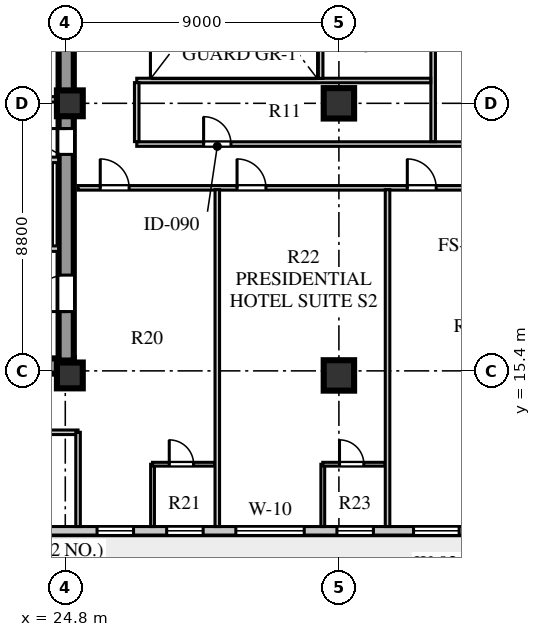
"""IFC4 building model, lengths in metres.
Left out: names, types, materials, properties, quantities, classifications, styles, units other than length and angle.
Written with IfcOpenShell. Run it as: python <this file> out.ifc"""

import sys

from ifc_helpers import new_model, si_unit, direction, frame, frame_2d, origin, origin_2d, place, context, subcontext, project, spatial, rectangle, extrude, element, fill, save


model = new_model("IFC4")
c1 = context("Model", 3, precision=1e-05, world=origin(), true_north=direction((0.0, 1.0)))
c2 = subcontext(c1, "Body", "Model", "MODEL_VIEW")
j1 = project(units=[si_unit("LENGTHUNIT", "METRE"), si_unit("PLANEANGLEUNIT", "RADIAN")], contexts=[c1])
p1 = place(None, origin())
s1 = spatial("IfcSite", under=j1, at=p1, CompositionType="ELEMENT")
p2 = place(p1, origin())
s2 = spatial("IfcBuilding", under=s1, at=p2, CompositionType="ELEMENT")
p3 = place(p2, frame((0.0, 0.0, 134.8)))
s3 = spatial("IfcBuildingStorey", under=s2, at=p3, CompositionType="ELEMENT", Elevation=134.8)
p4 = place(p3, frame((15.4, 15.56, 0.0), z_axis=(0.0, 0.0, 1.0), x_axis=(1.0, 0.0, 0.0)))
e1 = element("IfcWall", 1, at=p4, inside=s3, PredefinedType="SHEAR", context=c2, shape_type="SweptSolid", body=[
    extrude(rectangle(XDim=9.68, YDim=0.5, at=frame_2d((4.84, 0.0))), origin(), (0.0, 0.0, 1.0), 3.6),
])
p5 = place(p3, frame((24.83, 15.74, 0.0), z_axis=(0.0, 0.0, 1.0), x_axis=(0.0, 1.0, 0.0)))
e2 = element("IfcWall", 2, at=p5, inside=s3, PredefinedType="SHEAR", context=c2, shape_type="SweptSolid", body=[
    extrude(rectangle(XDim=25.76, YDim=0.5, at=frame_2d((12.88, 0.0))), origin(), (0.0, 0.0, 1.0), 3.6),
])
p6 = place(p5, frame((1.61, 0.0, 0.0)))
e3 = element("IfcOpeningElement", 3, at=p6, cuts=e2, PredefinedType="OPENING", context=c2, shape_type="SweptSolid", body=[
    extrude(rectangle(XDim=1.2, YDim=2.1, at=frame_2d((0.6, 1.05))), frame((0.0, 0.26, 0.0), z_axis=(0.0, -1.0, 0.0), x_axis=(1.0, 0.0, 0.0)), (0.0, 0.0, 1.0), 0.52),
])
p7 = place(p5, frame((6.78, 0.0, 0.0)))
e4 = element("IfcOpeningElement", 4, at=p7, cuts=e2, PredefinedType="OPENING", context=c2, shape_type="SweptSolid", body=[
    extrude(rectangle(XDim=0.85, YDim=2.06, at=frame_2d((0.425, 1.03))), frame((0.0, 0.26, 0.0), z_axis=(0.0, -1.0, 0.0), x_axis=(1.0, 0.0, 0.0)), (0.0, 0.0, 1.0), 0.52),
])
p8 = place(p5, frame((12.11, 0.0, 0.0)))
e5 = element("IfcOpeningElement", 5, at=p8, cuts=e2, PredefinedType="OPENING", context=c2, shape_type="SweptSolid", body=[
    extrude(rectangle(XDim=1.5, YDim=2.12, at=frame_2d((0.75, 1.06))), frame((0.0, 0.26, 0.0), z_axis=(0.0, -1.0, 0.0), x_axis=(1.0, 0.0, 0.0)), (0.0, 0.0, 1.0), 0.52),
])
p9 = place(p5, frame((20.11, 0.0, 0.0)))
e6 = element("IfcOpeningElement", 6, at=p9, cuts=e2, PredefinedType="OPENING", context=c2, shape_type="SweptSolid", body=[
    extrude(rectangle(XDim=1.2, YDim=2.12, at=frame_2d((0.6, 1.06))), frame((0.0, 0.26, 0.0), z_axis=(0.0, -1.0, 0.0), x_axis=(1.0, 0.0, 0.0)), (0.0, 0.0, 1.0), 0.52),
])
p10 = place(p5, frame((24.01, 0.0, 0.0)))
e7 = element("IfcOpeningElement", 7, at=p10, cuts=e2, PredefinedType="OPENING", context=c2, shape_type="SweptSolid", body=[
    extrude(rectangle(XDim=0.95, YDim=2.1, at=frame_2d((0.475, 1.05))), frame((0.0, 0.26, 0.0), z_axis=(0.0, -1.0, 0.0), x_axis=(1.0, 0.0, 0.0)), (0.0, 0.0, 1.0), 0.52),
])
for number, where, z_axis, x_axis in (
    (8, (24.95, 15.25, 0.0), (0.0, 0.0, 1.0), (1.0, 0.0, 0.0)),
    (9, (24.95, 24.2, 0.0), (0.0, 0.0, 1.0), (1.0, 0.0, 0.0)),
):
    element("IfcColumn", number, at=place(p3, frame(where, z_axis=z_axis, x_axis=x_axis)), inside=s3, PredefinedType="COLUMN", context=c2, shape_type="SweptSolid", body=[
        extrude(rectangle(XDim=0.85, YDim=0.85, at=origin_2d()), origin(), (0.0, 0.0, 1.0), 3.6),
    ])
for number, where, z_axis, x_axis in (
    (10, (33.8, 15.25, 0.0), (0.0, 0.0, 1.0), (1.0, 0.0, 0.0)),
    (11, (33.8, 24.2, 0.0), (0.0, 0.0, 1.0), (1.0, 0.0, 0.0)),
):
    element("IfcColumn", number, at=place(p3, frame(where, z_axis=z_axis, x_axis=x_axis)), inside=s3, PredefinedType="COLUMN", context=c2, shape_type="SweptSolid", body=[
        extrude(rectangle(XDim=1.0, YDim=1.0, at=origin_2d()), origin(), (0.0, 0.0, 1.0), 3.6),
    ])
p11 = place(p3, frame((13.25, 10.14, 0.0), z_axis=(0.0, 0.0, 1.0), x_axis=(1.0, 0.0, 0.0)))
e12 = element("IfcWall", 12, at=p11, inside=s3, PredefinedType="STANDARD", context=c2, shape_type="SweptSolid", body=[
    extrude(rectangle(XDim=32.1, YDim=0.28, at=frame_2d((16.05, 0.0))), origin(), (0.0, 0.0, 1.0), 3.6),
])
p12 = place(p11, frame((0.95, 0.0, 0.0)))
e13 = element("IfcOpeningElement", 13, at=p12, cuts=e12, PredefinedType="OPENING", context=c2, shape_type="SweptSolid", body=[
    extrude(rectangle(XDim=1.0, YDim=2.05, at=frame_2d((0.5, 1.025))), frame((0.0, 0.15, 0.0), z_axis=(0.0, -1.0, 0.0), x_axis=(1.0, 0.0, 0.0)), (0.0, 0.0, 1.0), 0.3),
])
p13 = place(p11, frame((6.255, 0.0, 0.8)))
e14 = element("IfcOpeningElement", 14, at=p13, cuts=e12, PredefinedType="OPENING", context=c2, shape_type="SweptSolid", body=[
    extrude(rectangle(XDim=1.35, YDim=1.9, at=frame_2d((0.675, 0.95))), frame((0.0, 0.15, 0.0), z_axis=(0.0, -1.0, 0.0), x_axis=(1.0, 0.0, 0.0)), (0.0, 0.0, 1.0), 0.3),
])
p14 = place(p11, frame((12.595, 0.0, 0.8)))
e15 = element("IfcOpeningElement", 15, at=p14, cuts=e12, PredefinedType="OPENING", context=c2, shape_type="SweptSolid", body=[
    extrude(rectangle(XDim=1.2, YDim=1.75, at=frame_2d((0.6, 0.875))), frame((0.0, 0.15, 0.0), z_axis=(0.0, -1.0, 0.0), x_axis=(1.0, 0.0, 0.0)), (0.0, 0.0, 1.0), 0.3),
])
p15 = place(p11, frame((14.885, 0.0, 0.8)))
e16 = element("IfcOpeningElement", 16, at=p15, cuts=e12, PredefinedType="OPENING", context=c2, shape_type="SweptSolid", body=[
    extrude(rectangle(XDim=1.2, YDim=1.75, at=frame_2d((0.6, 0.875))), frame((0.0, 0.15, 0.0), z_axis=(0.0, -1.0, 0.0), x_axis=(1.0, 0.0, 0.0)), (0.0, 0.0, 1.0), 0.3),
])
p16 = place(p11, frame((17.16, 0.0, 0.8)))
e17 = element("IfcOpeningElement", 17, at=p16, cuts=e12, PredefinedType="OPENING", context=c2, shape_type="SweptSolid", body=[
    extrude(rectangle(XDim=2.25, YDim=2.0, at=frame_2d((1.125, 1.0))), frame((0.0, 0.15, 0.0), z_axis=(0.0, -1.0, 0.0), x_axis=(1.0, 0.0, 0.0)), (0.0, 0.0, 1.0), 0.3),
])
p17 = place(p11, frame((20.485, 0.0, 0.8)))
e18 = element("IfcOpeningElement", 18, at=p17, cuts=e12, PredefinedType="OPENING", context=c2, shape_type="SweptSolid", body=[
    extrude(rectangle(XDim=1.2, YDim=1.75, at=frame_2d((0.6, 0.875))), frame((0.0, 0.15, 0.0), z_axis=(0.0, -1.0, 0.0), x_axis=(1.0, 0.0, 0.0)), (0.0, 0.0, 1.0), 0.3),
])
p18 = place(p11, frame((23.005, 0.0, 0.8)))
e19 = element("IfcOpeningElement", 19, at=p18, cuts=e12, PredefinedType="OPENING", context=c2, shape_type="SweptSolid", body=[
    extrude(rectangle(XDim=1.5, YDim=2.0, at=frame_2d((0.75, 1.0))), frame((0.0, 0.15, 0.0), z_axis=(0.0, -1.0, 0.0), x_axis=(1.0, 0.0, 0.0)), (0.0, 0.0, 1.0), 0.3),
])
p19 = place(p11, frame((25.865, 0.0, 0.8)))
e20 = element("IfcOpeningElement", 20, at=p19, cuts=e12, PredefinedType="OPENING", context=c2, shape_type="SweptSolid", body=[
    extrude(rectangle(XDim=1.2, YDim=1.75, at=frame_2d((0.6, 0.875))), frame((0.0, 0.15, 0.0), z_axis=(0.0, -1.0, 0.0), x_axis=(1.0, 0.0, 0.0)), (0.0, 0.0, 1.0), 0.3),
])
p20 = place(p11, frame((28.58, 0.0, 0.8)))
e21 = element("IfcOpeningElement", 21, at=p20, cuts=e12, PredefinedType="OPENING", context=c2, shape_type="SweptSolid", body=[
    extrude(rectangle(XDim=2.4, YDim=2.05, at=frame_2d((1.2, 1.025))), frame((0.0, 0.15, 0.0), z_axis=(0.0, -1.0, 0.0), x_axis=(1.0, 0.0, 0.0)), (0.0, 0.0, 1.0), 0.3),
])
p21 = place(p3, frame((19.64, 19.42, 0.0), z_axis=(0.0, 0.0, 1.0), x_axis=(1.0, 0.0, 0.0)))
e22 = element("IfcWall", 22, at=p21, inside=s3, PredefinedType="SOLIDWALL", context=c2, shape_type="SweptSolid", body=[
    extrude(rectangle(XDim=4.94, YDim=0.18, at=frame_2d((2.47, 0.0))), origin(), (0.0, 0.0, 1.0), 3.6),
])
p22 = place(p21, frame((0.72, 0.0, 0.0)))
e23 = element("IfcOpeningElement", 23, at=p22, cuts=e22, PredefinedType="OPENING", context=c2, shape_type="SweptSolid", body=[
    extrude(rectangle(XDim=1.1, YDim=2.1, at=frame_2d((0.55, 1.05))), frame((0.0, 0.1, 0.0), z_axis=(0.0, -1.0, 0.0), x_axis=(1.0, 0.0, 0.0)), (0.0, 0.0, 1.0), 0.2),
])
p23 = place(p21, frame((3.02, 0.0, 0.0)))
e24 = element("IfcOpeningElement", 24, at=p23, cuts=e22, PredefinedType="OPENING", context=c2, shape_type="SweptSolid", body=[
    extrude(rectangle(XDim=1.1, YDim=2.1, at=frame_2d((0.55, 1.05))), frame((0.0, 0.1, 0.0), z_axis=(0.0, -1.0, 0.0), x_axis=(1.0, 0.0, 0.0)), (0.0, 0.0, 1.0), 0.2),
])
p24 = place(p3, frame((19.64, 22.34, 0.0), z_axis=(0.0, 0.0, 1.0), x_axis=(1.0, 0.0, 0.0)))
e25 = element("IfcWall", 25, at=p24, inside=s3, PredefinedType="SOLIDWALL", context=c2, shape_type="SweptSolid", body=[
    extrude(rectangle(XDim=4.94, YDim=0.18, at=frame_2d((2.47, 0.0))), origin(), (0.0, 0.0, 1.0), 3.6),
])
p25 = place(p3, frame((15.9, 24.33, 0.0), z_axis=(0.0, 0.0, 1.0), x_axis=(1.0, 0.0, 0.0)))
e26 = element("IfcWall", 26, at=p25, inside=s3, PredefinedType="SOLIDWALL", context=c2, shape_type="SweptSolid", body=[
    extrude(rectangle(XDim=8.68, YDim=0.18, at=frame_2d((4.34, 0.0))), origin(), (0.0, 0.0, 1.0), 2.95),
])
p26 = place(p3, frame((25.22, 21.42, 0.0), z_axis=(0.0, 0.0, 1.0), x_axis=(1.0, 0.0, 0.0)))
e27 = element("IfcWall", 27, at=p26, inside=s3, PredefinedType="PARTITIONING", context=c2, shape_type="SweptSolid", body=[
    extrude(rectangle(XDim=15.6, YDim=0.15, at=frame_2d((7.8, 0.0))), origin(), (0.0, 0.0, 1.0), 3.2),
])
p27 = place(p26, frame((0.73, 0.0, 0.0)))
e28 = element("IfcOpeningElement", 28, at=p27, cuts=e27, PredefinedType="OPENING", context=c2, shape_type="SweptSolid", body=[
    extrude(rectangle(XDim=0.95, YDim=2.1, at=frame_2d((0.475, 1.05))), frame((0.0, 0.085, 0.0), z_axis=(0.0, -1.0, 0.0), x_axis=(1.0, 0.0, 0.0)), (0.0, 0.0, 1.0), 0.17),
])
p28 = place(p26, frame((5.23, 0.0, 0.0)))
e29 = element("IfcOpeningElement", 29, at=p28, cuts=e27, PredefinedType="OPENING", context=c2, shape_type="SweptSolid", body=[
    extrude(rectangle(XDim=0.95, YDim=2.1, at=frame_2d((0.475, 1.05))), frame((0.0, 0.085, 0.0), z_axis=(0.0, -1.0, 0.0), x_axis=(1.0, 0.0, 0.0)), (0.0, 0.0, 1.0), 0.17),
])
p29 = place(p26, frame((10.83, 0.0, 0.0)))
e30 = element("IfcOpeningElement", 30, at=p29, cuts=e27, PredefinedType="OPENING", context=c2, shape_type="SweptSolid", body=[
    extrude(rectangle(XDim=0.95, YDim=2.1, at=frame_2d((0.475, 1.05))), frame((0.0, 0.085, 0.0), z_axis=(0.0, -1.0, 0.0), x_axis=(1.0, 0.0, 0.0)), (0.0, 0.0, 1.0), 0.17),
])
p30 = place(p3, frame((27.15, 22.86, 0.0), z_axis=(0.0, 0.0, 1.0), x_axis=(1.0, 0.0, 0.0)))
e31 = element("IfcWall", 31, at=p30, inside=s3, PredefinedType="PARTITIONING", context=c2, shape_type="SweptSolid", body=[
    extrude(rectangle(XDim=13.67, YDim=0.15, at=frame_2d((6.835, 0.0))), origin(), (0.0, 0.0, 1.0), 3.6),
])
p31 = place(p30, frame((2.2, 0.0, 0.0)))
e32 = element("IfcOpeningElement", 32, at=p31, cuts=e31, PredefinedType="OPENING", context=c2, shape_type="SweptSolid", body=[
    extrude(rectangle(XDim=0.9, YDim=2.08, at=frame_2d((0.45, 1.04))), frame((0.0, 0.085, 0.0), z_axis=(0.0, -1.0, 0.0), x_axis=(1.0, 0.0, 0.0)), (0.0, 0.0, 1.0), 0.17),
])
p32 = place(p3, frame((13.59, 13.38, 0.0), z_axis=(0.0, 0.0, 1.0), x_axis=(1.0, 0.0, 0.0)))
e33 = element("IfcWall", 33, at=p32, inside=s3, PredefinedType="PARTITIONING", context=c2, shape_type="SweptSolid", body=[
    extrude(rectangle(XDim=11.63, YDim=0.15, at=frame_2d((5.815, 0.0))), origin(), (0.0, 0.0, 1.0), 3.6),
])
p33 = place(p32, frame((4.56, 0.0, 0.0)))
e34 = element("IfcOpeningElement", 34, at=p33, cuts=e33, PredefinedType="OPENING", context=c2, shape_type="SweptSolid", body=[
    extrude(rectangle(XDim=1.0, YDim=2.08, at=frame_2d((0.5, 1.04))), frame((0.0, 0.085, 0.0), z_axis=(0.0, -1.0, 0.0), x_axis=(1.0, 0.0, 0.0)), (0.0, 0.0, 1.0), 0.17),
])
p34 = place(p3, frame((25.22, 10.28, 0.0), z_axis=(0.0, 0.0, 1.0), x_axis=(0.0, 1.0, 0.0)))
e35 = element("IfcWall", 35, at=p34, inside=s3, PredefinedType="PARTITIONING", context=c2, shape_type="SweptSolid", body=[
    extrude(rectangle(XDim=3.1, YDim=0.15, at=frame_2d((1.55, 0.0))), origin(), (0.0, 0.0, 1.0), 3.1),
])
p35 = place(p3, frame((36.9, 22.94, 0.0), z_axis=(0.0, 0.0, 1.0), x_axis=(0.0, 1.0, 0.0)))
e36 = element("IfcWall", 36, at=p35, inside=s3, PredefinedType="PARTITIONING", context=c2, shape_type="SweptSolid", body=[
    extrude(rectangle(XDim=4.28, YDim=0.15, at=frame_2d((2.14, 0.0))), origin(), (0.0, 0.0, 1.0), 3.6),
])
p36 = place(p3, frame((27.15, 24.95, 0.0), z_axis=(0.0, 0.0, 1.0), x_axis=(1.0, 0.0, 0.0)))
e37 = element("IfcWall", 37, at=p36, inside=s3, PredefinedType="PARTITIONING", context=c2, shape_type="SweptSolid", body=[
    extrude(rectangle(XDim=9.67, YDim=0.15, at=frame_2d((4.835, 0.0))), origin(), (0.0, 0.0, 1.0), 3.05),
])
p37 = place(p3, frame((27.15, 22.94, 0.0), z_axis=(0.0, 0.0, 1.0), x_axis=(0.0, 1.0, 0.0)))
e38 = element("IfcWall", 38, at=p37, inside=s3, PredefinedType="PARTITIONING", context=c2, shape_type="SweptSolid", body=[
    extrude(rectangle(XDim=1.94, YDim=0.15, at=frame_2d((0.97, 0.0))), origin(), (0.0, 0.0, 1.0), 3.6),
])
p38 = place(p3, frame((33.2, 25.02, 0.0), z_axis=(0.0, 0.0, 1.0), x_axis=(0.0, 1.0, 0.0)))
e39 = element("IfcWall", 39, at=p38, inside=s3, PredefinedType="PARTITIONING", context=c2, shape_type="SweptSolid", body=[
    extrude(rectangle(XDim=2.2, YDim=0.15, at=frame_2d((1.1, 0.0))), origin(), (0.0, 0.0, 1.0), 3.05),
])
p39 = place(p3, frame((27.67, 10.28, 0.0), z_axis=(0.0, 0.0, 1.0), x_axis=(0.0, 1.0, 0.0)))
e40 = element("IfcWall", 40, at=p39, inside=s3, PredefinedType="PLUMBINGWALL", context=c2, shape_type="SweptSolid", body=[
    extrude(rectangle(XDim=2.05, YDim=0.125, at=frame_2d((1.025, 0.0))), origin(), (0.0, 0.0, 1.0), 3.6),
])
p40 = place(p3, frame((27.67, 12.33, 0.0), z_axis=(0.0, 0.0, 1.0), x_axis=(1.0, 0.0, 0.0)))
e41 = element("IfcWall", 41, at=p40, inside=s3, PredefinedType="PLUMBINGWALL", context=c2, shape_type="SweptSolid", body=[
    extrude(rectangle(XDim=2.05, YDim=0.125, at=frame_2d((1.025, 0.0))), origin(), (0.0, 0.0, 1.0), 3.6),
])
p41 = place(p40, frame((0.55, 0.0, 0.0)))
e42 = element("IfcOpeningElement", 42, at=p41, cuts=e41, PredefinedType="OPENING", context=c2, shape_type="SweptSolid", body=[
    extrude(rectangle(XDim=0.8, YDim=2.05, at=frame_2d((0.4, 1.025))), frame((0.0, 0.073, 0.0), z_axis=(0.0, -1.0, 0.0), x_axis=(1.0, 0.0, 0.0)), (0.0, 0.0, 1.0), 0.145),
])
p42 = place(p3, frame((29.8, 10.28, 0.0), z_axis=(0.0, 0.0, 1.0), x_axis=(0.0, 1.0, 0.0)))
e43 = element("IfcWall", 43, at=p42, inside=s3, PredefinedType="PARTITIONING", context=c2, shape_type="SweptSolid", body=[
    extrude(rectangle(XDim=11.08, YDim=0.15, at=frame_2d((5.54, 0.0))), origin(), (0.0, 0.0, 1.0), 3.6),
])
p43 = place(p3, frame((33.27, 10.28, 0.0), z_axis=(0.0, 0.0, 1.0), x_axis=(0.0, 1.0, 0.0)))
e44 = element("IfcWall", 44, at=p43, inside=s3, PredefinedType="PLUMBINGWALL", context=c2, shape_type="SweptSolid", body=[
    extrude(rectangle(XDim=2.05, YDim=0.125, at=frame_2d((1.025, 0.0))), origin(), (0.0, 0.0, 1.0), 3.6),
])
p44 = place(p3, frame((33.27, 12.33, 0.0), z_axis=(0.0, 0.0, 1.0), x_axis=(1.0, 0.0, 0.0)))
e45 = element("IfcWall", 45, at=p44, inside=s3, PredefinedType="PLUMBINGWALL", context=c2, shape_type="SweptSolid", body=[
    extrude(rectangle(XDim=2.05, YDim=0.125, at=frame_2d((1.025, 0.0))), origin(), (0.0, 0.0, 1.0), 3.6),
])
p45 = place(p44, frame((0.55, 0.0, 0.0)))
e46 = element("IfcOpeningElement", 46, at=p45, cuts=e45, PredefinedType="OPENING", context=c2, shape_type="SweptSolid", body=[
    extrude(rectangle(XDim=0.8, YDim=2.05, at=frame_2d((0.4, 1.025))), frame((0.0, 0.073, 0.0), z_axis=(0.0, -1.0, 0.0), x_axis=(1.0, 0.0, 0.0)), (0.0, 0.0, 1.0), 0.145),
])
p46 = place(p3, frame((35.4, 10.28, 0.0), z_axis=(0.0, 0.0, 1.0), x_axis=(0.0, 1.0, 0.0)))
e47 = element("IfcWall", 47, at=p46, inside=s3, PredefinedType="PARTITIONING", context=c2, shape_type="SweptSolid", body=[
    extrude(rectangle(XDim=11.08, YDim=0.15, at=frame_2d((5.54, 0.0))), origin(), (0.0, 0.0, 1.0), 3.6),
])
p47 = place(p14, origin())
e48 = element("IfcWindow", 48, at=p47, inside=s3, PartitioningType="SINGLE_PANEL", PredefinedType="WINDOW", context=c2, shape_type="SweptSolid", body=[
    extrude(rectangle(XDim=1.2, YDim=1.75, at=frame_2d((0.6, 0.875))), frame((0.0, 0.03, 0.0), z_axis=(0.0, -1.0, 0.0), x_axis=(1.0, 0.0, 0.0)), (0.0, 0.0, 1.0), 0.06),
])
fill(e15, e48)
p48 = place(p15, origin())
e49 = element("IfcWindow", 49, at=p48, inside=s3, PartitioningType="SINGLE_PANEL", PredefinedType="WINDOW", context=c2, shape_type="SweptSolid", body=[
    extrude(rectangle(XDim=1.2, YDim=1.75, at=frame_2d((0.6, 0.875))), frame((0.0, 0.03, 0.0), z_axis=(0.0, -1.0, 0.0), x_axis=(1.0, 0.0, 0.0)), (0.0, 0.0, 1.0), 0.06),
])
fill(e16, e49)
p49 = place(p16, origin())
e50 = element("IfcWindow", 50, at=p49, inside=s3, PartitioningType="SINGLE_PANEL", PredefinedType="WINDOW", context=c2, shape_type="SweptSolid", body=[
    extrude(rectangle(XDim=2.25, YDim=2.0, at=frame_2d((1.125, 1.0))), frame((0.0, 0.03, 0.0), z_axis=(0.0, -1.0, 0.0), x_axis=(1.0, 0.0, 0.0)), (0.0, 0.0, 1.0), 0.06),
])
fill(e17, e50)
p50 = place(p17, origin())
e51 = element("IfcWindow", 51, at=p50, inside=s3, PartitioningType="SINGLE_PANEL", PredefinedType="WINDOW", context=c2, shape_type="SweptSolid", body=[
    extrude(rectangle(XDim=1.2, YDim=1.75, at=frame_2d((0.6, 0.875))), frame((0.0, 0.03, 0.0), z_axis=(0.0, -1.0, 0.0), x_axis=(1.0, 0.0, 0.0)), (0.0, 0.0, 1.0), 0.06),
])
fill(e18, e51)
p51 = place(p18, origin())
e52 = element("IfcWindow", 52, at=p51, inside=s3, PartitioningType="SINGLE_PANEL", PredefinedType="WINDOW", context=c2, shape_type="SweptSolid", body=[
    extrude(rectangle(XDim=1.5, YDim=2.0, at=frame_2d((0.75, 1.0))), frame((0.0, 0.03, 0.0), z_axis=(0.0, -1.0, 0.0), x_axis=(1.0, 0.0, 0.0)), (0.0, 0.0, 1.0), 0.06),
])
fill(e19, e52)
p52 = place(p6, frame((1.2, 0.0, 0.0), z_axis=(0.0, 0.0, 1.0), x_axis=(-1.0, 0.0, 0.0)))
e53 = element("IfcDoor", 53, at=p52, inside=s3, OperationType="SINGLE_SWING_RIGHT", PredefinedType="DOOR", context=c2, shape_type="SweptSolid", body=[
    extrude(rectangle(XDim=1.2, YDim=2.1, at=frame_2d((0.6, 1.05))), frame((0.0, 0.025, 0.0), z_axis=(0.0, -1.0, 0.0), x_axis=(1.0, 0.0, 0.0)), (0.0, 0.0, 1.0), 0.05),
])
fill(e3, e53)
p53 = place(p7, frame((0.85, 0.0, 0.0), z_axis=(0.0, 0.0, 1.0), x_axis=(-1.0, 0.0, 0.0)))
e54 = element("IfcDoor", 54, at=p53, inside=s3, OperationType="SINGLE_SWING_LEFT", PredefinedType="DOOR", context=c2, shape_type="SweptSolid", body=[
    extrude(rectangle(XDim=0.85, YDim=2.06, at=frame_2d((0.425, 1.03))), frame((0.0, 0.025, 0.0), z_axis=(0.0, -1.0, 0.0), x_axis=(1.0, 0.0, 0.0)), (0.0, 0.0, 1.0), 0.05),
])
fill(e4, e54)
p54 = place(p31, origin())
e55 = element("IfcDoor", 55, at=p54, inside=s3, OperationType="SINGLE_SWING_LEFT", PredefinedType="DOOR", context=c2, shape_type="SweptSolid", body=[
    extrude(rectangle(XDim=0.9, YDim=2.08, at=frame_2d((0.45, 1.04))), frame((0.0, 0.025, 0.0), z_axis=(0.0, -1.0, 0.0), x_axis=(1.0, 0.0, 0.0)), (0.0, 0.0, 1.0), 0.05),
])
fill(e32, e55)
p55 = place(p27, frame((0.95, 0.0, 0.0), z_axis=(0.0, 0.0, 1.0), x_axis=(-1.0, 0.0, 0.0)))
e56 = element("IfcDoor", 56, at=p55, inside=s3, OperationType="SINGLE_SWING_RIGHT", PredefinedType="DOOR", context=c2, shape_type="SweptSolid", body=[
    extrude(rectangle(XDim=0.95, YDim=2.1, at=frame_2d((0.475, 1.05))), frame((0.0, 0.025, 0.0), z_axis=(0.0, -1.0, 0.0), x_axis=(1.0, 0.0, 0.0)), (0.0, 0.0, 1.0), 0.05),
])
fill(e28, e56)
p56 = place(p41, origin())
e57 = element("IfcDoor", 57, at=p56, inside=s3, OperationType="SINGLE_SWING_LEFT", PredefinedType="DOOR", context=c2, shape_type="SweptSolid", body=[
    extrude(rectangle(XDim=0.8, YDim=2.05, at=frame_2d((0.4, 1.025))), frame((0.0, 0.025, 0.0), z_axis=(0.0, -1.0, 0.0), x_axis=(1.0, 0.0, 0.0)), (0.0, 0.0, 1.0), 0.05),
])
fill(e42, e57)
p57 = place(p28, frame((0.95, 0.0, 0.0), z_axis=(0.0, 0.0, 1.0), x_axis=(-1.0, 0.0, 0.0)))
e58 = element("IfcDoor", 58, at=p57, inside=s3, OperationType="SINGLE_SWING_RIGHT", PredefinedType="DOOR", context=c2, shape_type="SweptSolid", body=[
    extrude(rectangle(XDim=0.95, YDim=2.1, at=frame_2d((0.475, 1.05))), frame((0.0, 0.025, 0.0), z_axis=(0.0, -1.0, 0.0), x_axis=(1.0, 0.0, 0.0)), (0.0, 0.0, 1.0), 0.05),
])
fill(e29, e58)
p58 = place(p45, origin())
e59 = element("IfcDoor", 59, at=p58, inside=s3, OperationType="SINGLE_SWING_LEFT", PredefinedType="DOOR", context=c2, shape_type="SweptSolid", body=[
    extrude(rectangle(XDim=0.8, YDim=2.05, at=frame_2d((0.4, 1.025))), frame((0.0, 0.025, 0.0), z_axis=(0.0, -1.0, 0.0), x_axis=(1.0, 0.0, 0.0)), (0.0, 0.0, 1.0), 0.05),
])
fill(e46, e59)
p59 = place(p29, frame((0.95, 0.0, 0.0), z_axis=(0.0, 0.0, 1.0), x_axis=(-1.0, 0.0, 0.0)))
e60 = element("IfcDoor", 60, at=p59, inside=s3, OperationType="SINGLE_SWING_RIGHT", PredefinedType="DOOR", context=c2, shape_type="SweptSolid", body=[
    extrude(rectangle(XDim=0.95, YDim=2.1, at=frame_2d((0.475, 1.05))), frame((0.0, 0.025, 0.0), z_axis=(0.0, -1.0, 0.0), x_axis=(1.0, 0.0, 0.0)), (0.0, 0.0, 1.0), 0.05),
])
fill(e30, e60)
save(model, sys.argv[1])
